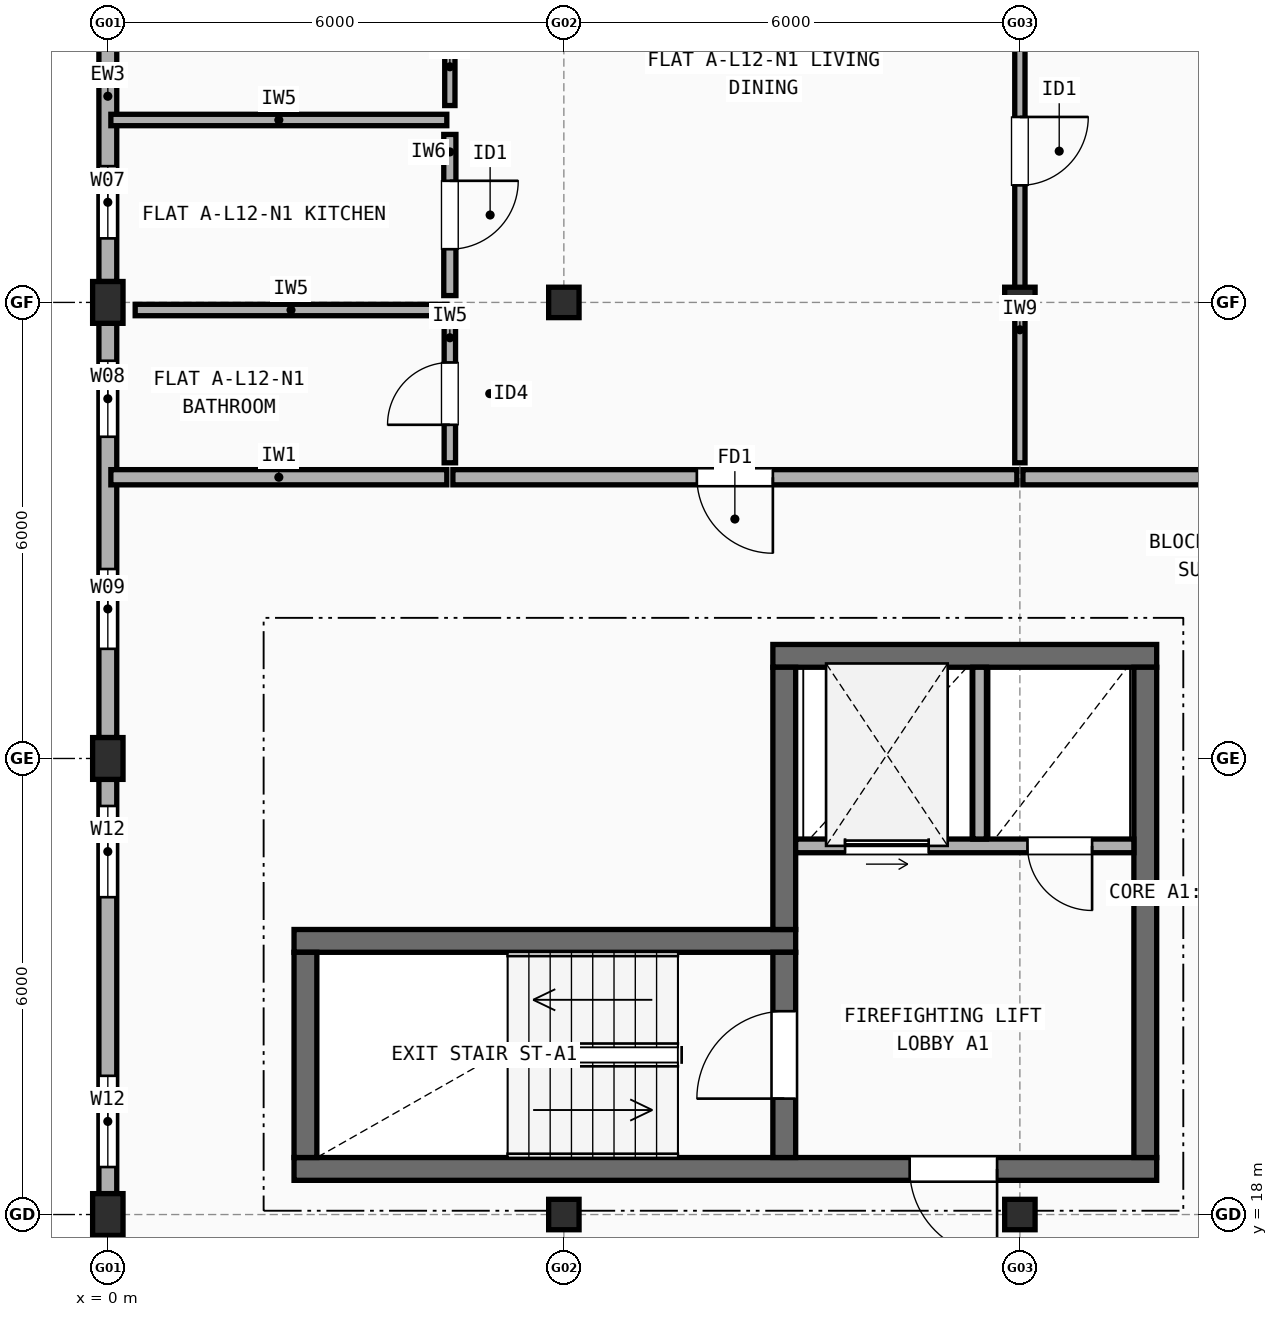
"""IFC4 building model, lengths in metres.
Left out: names, types, materials, properties, quantities, classifications, styles, units other than length and angle.
Written with IfcOpenShell. Run it as: python <this file> out.ifc"""

import sys

from ifc_helpers import new_model, si_unit, direction, frame, frame_2d, origin, origin_2d, place, context, subcontext, project, spatial, rectangle, extrude, element, fill, save


model = new_model("IFC4")
c1 = context("Model", 3, precision=1e-05, world=origin(), true_north=direction((0.0, 1.0)))
c2 = subcontext(c1, "Body", "Model", "MODEL_VIEW")
j1 = project(units=[si_unit("LENGTHUNIT", "METRE"), si_unit("PLANEANGLEUNIT", "RADIAN")], contexts=[c1])
p1 = place(None, origin())
s1 = spatial("IfcSite", under=j1, at=p1, CompositionType="ELEMENT")
p2 = place(p1, origin())
s2 = spatial("IfcBuilding", under=s1, at=p2, CompositionType="ELEMENT")
p3 = place(p2, frame((0.0, 0.0, 39.7)))
s3 = spatial("IfcBuildingStorey", under=s2, at=p3, CompositionType="ELEMENT", Elevation=39.7)
for number, where, z_axis, x_axis in (
    (1, (0.0, 18.0, 0.0), (0.0, 0.0, 1.0), (1.0, 0.0, 0.0)),
    (2, (0.0, 24.0, 0.0), (0.0, 0.0, 1.0), (1.0, 0.0, 0.0)),
    (3, (0.0, 30.0, 0.0), (0.0, 0.0, 1.0), (1.0, 0.0, 0.0)),
):
    element("IfcColumn", number, at=place(p3, frame(where, z_axis=z_axis, x_axis=x_axis)), inside=s3, PredefinedType="COLUMN", context=c2, shape_type="SweptSolid", body=[
        extrude(rectangle(XDim=0.4, YDim=0.55, at=origin_2d()), origin(), (0.0, 0.0, 1.0), 3.0),
    ])
for number, where, z_axis, x_axis in (
    (4, (6.0, 18.0, 0.0), (0.0, 0.0, 1.0), (1.0, 0.0, 0.0)),
    (5, (6.0, 30.0, 0.0), (0.0, 0.0, 1.0), (1.0, 0.0, 0.0)),
    (6, (12.0, 18.0, 0.0), (0.0, 0.0, 1.0), (1.0, 0.0, 0.0)),
    (7, (12.0, 30.0, 0.0), (0.0, 0.0, 1.0), (1.0, 0.0, 0.0)),
):
    element("IfcColumn", number, at=place(p3, frame(where, z_axis=z_axis, x_axis=x_axis)), inside=s3, PredefinedType="COLUMN", context=c2, shape_type="SweptSolid", body=[
        extrude(rectangle(XDim=0.4, YDim=0.4, at=origin_2d()), origin(), (0.0, 0.0, 1.0), 3.0),
    ])
p4 = place(p3, frame((0.0, 35.725, 0.0), z_axis=(0.0, 0.0, 1.0), x_axis=(0.0, -1.0, 0.0)))
e8 = element("IfcWall", 8, at=p4, inside=s3, PredefinedType="STANDARD", context=c2, shape_type="SweptSolid", body=[
    extrude(rectangle(XDim=5.45, YDim=0.235, at=frame_2d((2.725, 0.0))), origin(), (0.0, 0.0, 1.0), 2.482),
])
p5 = place(p4, frame((1.192, 0.0, 0.9)))
e9 = element("IfcOpeningElement", 9, at=p5, cuts=e8, PredefinedType="OPENING", context=c2, shape_type="SweptSolid", body=[
    extrude(rectangle(XDim=0.9, YDim=1.4, at=frame_2d((0.45, 0.7))), frame((0.0, 0.127, 0.0), z_axis=(0.0, -1.0, 0.0), x_axis=(1.0, 0.0, 0.0)), (0.0, 0.0, 1.0), 0.255),
])
p6 = place(p4, frame((3.933, 0.0, 0.9)))
e10 = element("IfcOpeningElement", 10, at=p6, cuts=e8, PredefinedType="OPENING", context=c2, shape_type="SweptSolid", body=[
    extrude(rectangle(XDim=0.95, YDim=1.35, at=frame_2d((0.475, 0.675))), frame((0.0, 0.127, 0.0), z_axis=(0.0, -1.0, 0.0), x_axis=(1.0, 0.0, 0.0)), (0.0, 0.0, 1.0), 0.255),
])
p7 = place(p3, frame((0.0, 29.725, 0.0), z_axis=(0.0, 0.0, 1.0), x_axis=(0.0, -1.0, 0.0)))
e11 = element("IfcWall", 11, at=p7, inside=s3, PredefinedType="STANDARD", context=c2, shape_type="SweptSolid", body=[
    extrude(rectangle(XDim=5.45, YDim=0.235, at=frame_2d((2.725, 0.0))), origin(), (0.0, 0.0, 1.0), 2.482),
])
p8 = place(p7, frame((0.492, 0.0, 0.9)))
e12 = element("IfcOpeningElement", 12, at=p8, cuts=e11, PredefinedType="OPENING", context=c2, shape_type="SweptSolid", body=[
    extrude(rectangle(XDim=1.0, YDim=1.4, at=frame_2d((0.5, 0.7))), frame((0.0, 0.127, 0.0), z_axis=(0.0, -1.0, 0.0), x_axis=(1.0, 0.0, 0.0)), (0.0, 0.0, 1.0), 0.255),
])
p9 = place(p7, frame((3.232, 0.0, 0.9)))
e13 = element("IfcOpeningElement", 13, at=p9, cuts=e11, PredefinedType="OPENING", context=c2, shape_type="SweptSolid", body=[
    extrude(rectangle(XDim=1.05, YDim=1.35, at=frame_2d((0.525, 0.675))), frame((0.0, 0.127, 0.0), z_axis=(0.0, -1.0, 0.0), x_axis=(1.0, 0.0, 0.0)), (0.0, 0.0, 1.0), 0.255),
])
p10 = place(p3, frame((0.0, 23.725, 0.0), z_axis=(0.0, 0.0, 1.0), x_axis=(0.0, -1.0, 0.0)))
e14 = element("IfcWall", 14, at=p10, inside=s3, PredefinedType="STANDARD", context=c2, shape_type="SweptSolid", body=[
    extrude(rectangle(XDim=5.45, YDim=0.235, at=frame_2d((2.725, 0.0))), origin(), (0.0, 0.0, 1.0), 2.482),
])
p11 = place(p10, frame((0.35, 0.0, 0.9)))
e15 = element("IfcOpeningElement", 15, at=p11, cuts=e14, PredefinedType="OPENING", context=c2, shape_type="SweptSolid", body=[
    extrude(rectangle(XDim=1.2, YDim=1.35, at=frame_2d((0.6, 0.675))), frame((0.0, 0.127, 0.0), z_axis=(0.0, -1.0, 0.0), x_axis=(1.0, 0.0, 0.0)), (0.0, 0.0, 1.0), 0.255),
])
p12 = place(p10, frame((3.9, 0.0, 0.9)))
e16 = element("IfcOpeningElement", 16, at=p12, cuts=e14, PredefinedType="OPENING", context=c2, shape_type="SweptSolid", body=[
    extrude(rectangle(XDim=1.2, YDim=1.35, at=frame_2d((0.6, 0.675))), frame((0.0, 0.127, 0.0), z_axis=(0.0, -1.0, 0.0), x_axis=(1.0, 0.0, 0.0)), (0.0, 0.0, 1.0), 0.255),
])
p13 = place(p3, frame((0.0, 17.725, 0.0), z_axis=(0.0, 0.0, 1.0), x_axis=(0.0, -1.0, 0.0)))
e17 = element("IfcWall", 17, at=p13, inside=s3, PredefinedType="STANDARD", context=c2, shape_type="SweptSolid", body=[
    extrude(rectangle(XDim=5.45, YDim=0.235, at=frame_2d((2.725, 0.0))), origin(), (0.0, 0.0, 1.0), 2.482),
])
p14 = place(p13, frame((0.692, 0.0, 0.9)))
e18 = element("IfcOpeningElement", 18, at=p14, cuts=e17, PredefinedType="OPENING", context=c2, shape_type="SweptSolid", body=[
    extrude(rectangle(XDim=0.9, YDim=1.4, at=frame_2d((0.45, 0.7))), frame((0.0, 0.127, 0.0), z_axis=(0.0, -1.0, 0.0), x_axis=(1.0, 0.0, 0.0)), (0.0, 0.0, 1.0), 0.255),
])
p15 = place(p13, frame((3.025, 0.0, 0.9)))
e19 = element("IfcOpeningElement", 19, at=p15, cuts=e17, PredefinedType="OPENING", context=c2, shape_type="SweptSolid", body=[
    extrude(rectangle(XDim=0.95, YDim=1.35, at=frame_2d((0.475, 0.675))), frame((0.0, 0.127, 0.0), z_axis=(0.0, -1.0, 0.0), x_axis=(1.0, 0.0, 0.0)), (0.0, 0.0, 1.0), 0.255),
])
p16 = place(p3, frame((2.45, 18.6, 0.0), z_axis=(0.0, 0.0, 1.0), x_axis=(1.0, 0.0, 0.0)))
e20 = element("IfcWall", 20, at=p16, inside=s3, PredefinedType="SHEAR", context=c2, shape_type="SweptSolid", body=[
    extrude(rectangle(XDim=11.35, YDim=0.3, at=frame_2d((5.675, 0.0))), origin(), (0.0, 0.0, 1.0), 3.0),
])
p17 = place(p16, frame((8.1, 0.0, 0.0)))
e21 = element("IfcOpeningElement", 21, at=p17, cuts=e20, PredefinedType="OPENING", context=c2, shape_type="SweptSolid", body=[
    extrude(rectangle(XDim=1.15, YDim=2.15, at=frame_2d((0.575, 1.075))), frame((0.0, 0.16, 0.0), z_axis=(0.0, -1.0, 0.0), x_axis=(1.0, 0.0, 0.0)), (0.0, 0.0, 1.0), 0.32),
])
p18 = place(p3, frame((9.05, 21.6, 0.0), z_axis=(0.0, 0.0, 1.0), x_axis=(-1.0, 0.0, 0.0)))
e22 = element("IfcWall", 22, at=p18, inside=s3, PredefinedType="SHEAR", context=c2, shape_type="SweptSolid", body=[
    extrude(rectangle(XDim=6.6, YDim=0.3, at=frame_2d((3.3, 0.0))), origin(), (0.0, 0.0, 1.0), 3.0),
])
p19 = place(p3, frame((2.6, 21.45, 0.0), z_axis=(0.0, 0.0, 1.0), x_axis=(0.0, -1.0, 0.0)))
e23 = element("IfcWall", 23, at=p19, inside=s3, PredefinedType="SHEAR", context=c2, shape_type="SweptSolid", body=[
    extrude(rectangle(XDim=2.7, YDim=0.3, at=frame_2d((1.35, 0.0))), origin(), (0.0, 0.0, 1.0), 3.0),
])
p20 = place(p3, frame((8.9, 18.75, 0.0), z_axis=(0.0, 0.0, 1.0), x_axis=(0.0, 1.0, 0.0)))
e24 = element("IfcWall", 24, at=p20, inside=s3, PredefinedType="SHEAR", context=c2, shape_type="SweptSolid", body=[
    extrude(rectangle(XDim=2.7, YDim=0.3, at=frame_2d((1.35, 0.0))), origin(), (0.0, 0.0, 1.0), 3.0),
])
p21 = place(p20, frame((0.775, 0.0, 0.0)))
e25 = element("IfcOpeningElement", 25, at=p21, cuts=e24, PredefinedType="OPENING", context=c2, shape_type="SweptSolid", body=[
    extrude(rectangle(XDim=1.15, YDim=2.15, at=frame_2d((0.575, 1.075))), frame((0.0, 0.16, 0.0), z_axis=(0.0, -1.0, 0.0), x_axis=(1.0, 0.0, 0.0)), (0.0, 0.0, 1.0), 0.32),
])
p22 = place(p3, frame((13.8, 25.35, 0.0), z_axis=(0.0, 0.0, 1.0), x_axis=(-1.0, 0.0, 0.0)))
e26 = element("IfcWall", 26, at=p22, inside=s3, PredefinedType="SHEAR", context=c2, shape_type="SweptSolid", body=[
    extrude(rectangle(XDim=5.05, YDim=0.3, at=frame_2d((2.525, 0.0))), origin(), (0.0, 0.0, 1.0), 3.0),
])
p23 = place(p3, frame((13.65, 18.75, 0.0), z_axis=(0.0, 0.0, 1.0), x_axis=(0.0, 1.0, 0.0)))
e27 = element("IfcWall", 27, at=p23, inside=s3, PredefinedType="SHEAR", context=c2, shape_type="SweptSolid", body=[
    extrude(rectangle(XDim=6.45, YDim=0.3, at=frame_2d((3.225, 0.0))), origin(), (0.0, 0.0, 1.0), 3.0),
])
p24 = place(p3, frame((8.9, 21.75, 0.0), z_axis=(0.0, 0.0, 1.0), x_axis=(0.0, 1.0, 0.0)))
e28 = element("IfcWall", 28, at=p24, inside=s3, PredefinedType="SHEAR", context=c2, shape_type="SweptSolid", body=[
    extrude(rectangle(XDim=3.45, YDim=0.3, at=frame_2d((1.725, 0.0))), origin(), (0.0, 0.0, 1.0), 3.0),
])
p25 = place(p3, frame((9.05, 22.85, 0.0), z_axis=(0.0, 0.0, 1.0), x_axis=(1.0, 0.0, 0.0)))
e29 = element("IfcWall", 29, at=p25, inside=s3, PredefinedType="SOLIDWALL", context=c2, shape_type="SweptSolid", body=[
    extrude(rectangle(XDim=4.45, YDim=0.18, at=frame_2d((2.225, 0.0))), origin(), (0.0, 0.0, 1.0), 3.0),
])
p26 = place(p25, frame((0.65, 0.0, 0.0)))
e30 = element("IfcOpeningElement", 30, at=p26, cuts=e29, PredefinedType="OPENING", context=c2, shape_type="SweptSolid", body=[
    extrude(rectangle(XDim=1.1, YDim=2.15, at=frame_2d((0.55, 1.075))), frame((0.0, 0.1, 0.0), z_axis=(0.0, -1.0, 0.0), x_axis=(1.0, 0.0, 0.0)), (0.0, 0.0, 1.0), 0.2),
])
p27 = place(p25, frame((3.05, 0.0, 0.0)))
e31 = element("IfcOpeningElement", 31, at=p27, cuts=e29, PredefinedType="OPENING", context=c2, shape_type="SweptSolid", body=[
    extrude(rectangle(XDim=0.85, YDim=2.1, at=frame_2d((0.425, 1.05))), frame((0.0, 0.1, 0.0), z_axis=(0.0, -1.0, 0.0), x_axis=(1.0, 0.0, 0.0)), (0.0, 0.0, 1.0), 0.2),
])
p28 = place(p3, frame((11.47, 22.94, 0.0), z_axis=(0.0, 0.0, 1.0), x_axis=(0.0, 1.0, 0.0)))
e32 = element("IfcWall", 32, at=p28, inside=s3, PredefinedType="SOLIDWALL", context=c2, shape_type="SweptSolid", body=[
    extrude(rectangle(XDim=2.26, YDim=0.18, at=frame_2d((1.13, 0.0))), origin(), (0.0, 0.0, 1.0), 3.0),
])
p29 = place(p3, frame((0.04, 27.7, 0.0), z_axis=(0.0, 0.0, 1.0), x_axis=(1.0, 0.0, 0.0)))
e33 = element("IfcWall", 33, at=p29, inside=s3, PredefinedType="SOLIDWALL", context=c2, shape_type="SweptSolid", body=[
    extrude(rectangle(XDim=4.42, YDim=0.2, at=frame_2d((2.21, 0.0))), origin(), (0.0, 0.0, 1.0), 2.482),
])
p30 = place(p3, frame((4.54, 27.7, 0.0), z_axis=(0.0, 0.0, 1.0), x_axis=(1.0, 0.0, 0.0)))
e34 = element("IfcWall", 34, at=p30, inside=s3, PredefinedType="SOLIDWALL", context=c2, shape_type="SweptSolid", body=[
    extrude(rectangle(XDim=7.42, YDim=0.2, at=frame_2d((3.71, 0.0))), origin(), (0.0, 0.0, 1.0), 2.508),
])
p31 = place(p30, frame((3.21, 0.0, 0.0)))
e35 = element("IfcOpeningElement", 35, at=p31, cuts=e34, PredefinedType="OPENING", context=c2, shape_type="SweptSolid", body=[
    extrude(rectangle(XDim=1.0, YDim=2.15, at=frame_2d((0.5, 1.075))), frame((0.0, 0.11, 0.0), z_axis=(0.0, -1.0, 0.0), x_axis=(1.0, 0.0, 0.0)), (0.0, 0.0, 1.0), 0.22),
])
p32 = place(p3, frame((4.5, 32.59, 0.0), z_axis=(0.0, 0.0, 1.0), x_axis=(0.0, 1.0, 0.0)))
e36 = element("IfcWall", 36, at=p32, inside=s3, PredefinedType="PARTITIONING", context=c2, shape_type="SweptSolid", body=[
    extrude(rectangle(XDim=3.22, YDim=0.135, at=frame_2d((1.61, 0.0))), origin(), (0.0, 0.0, 1.0), 3.0),
])
p33 = place(p32, frame((1.17, 0.0, 0.0)))
e37 = element("IfcOpeningElement", 37, at=p33, cuts=e36, PredefinedType="OPENING", context=c2, shape_type="SweptSolid", body=[
    extrude(rectangle(XDim=0.88, YDim=2.1, at=frame_2d((0.44, 1.05))), frame((0.0, 0.077, 0.0), z_axis=(0.0, -1.0, 0.0), x_axis=(1.0, 0.0, 0.0)), (0.0, 0.0, 1.0), 0.155),
])
p34 = place(p3, frame((4.5, 30.09, 0.0), z_axis=(0.0, 0.0, 1.0), x_axis=(0.0, 1.0, 0.0)))
e38 = element("IfcWall", 38, at=p34, inside=s3, PredefinedType="PLUMBINGWALL", context=c2, shape_type="SweptSolid", body=[
    extrude(rectangle(XDim=2.12, YDim=0.16, at=frame_2d((1.06, 0.0))), origin(), (0.0, 0.0, 1.0), 2.532),
])
p35 = place(p34, frame((0.61, 0.0, 0.0)))
e39 = element("IfcOpeningElement", 39, at=p35, cuts=e38, PredefinedType="OPENING", context=c2, shape_type="SweptSolid", body=[
    extrude(rectangle(XDim=0.9, YDim=2.1, at=frame_2d((0.45, 1.05))), frame((0.0, 0.09, 0.0), z_axis=(0.0, -1.0, 0.0), x_axis=(1.0, 0.0, 0.0)), (0.0, 0.0, 1.0), 0.18),
])
p36 = place(p3, frame((4.5, 27.89, 0.0), z_axis=(0.0, 0.0, 1.0), x_axis=(0.0, 1.0, 0.0)))
e40 = element("IfcWall", 40, at=p36, inside=s3, PredefinedType="PARTITIONING", context=c2, shape_type="SweptSolid", body=[
    extrude(rectangle(XDim=1.82, YDim=0.15, at=frame_2d((0.91, 0.0))), origin(), (0.0, 0.0, 1.0), 3.0),
])
p37 = place(p36, frame((0.5, 0.0, 0.0)))
e41 = element("IfcOpeningElement", 41, at=p37, cuts=e40, PredefinedType="OPENING", context=c2, shape_type="SweptSolid", body=[
    extrude(rectangle(XDim=0.82, YDim=2.08, at=frame_2d((0.41, 1.04))), frame((0.0, 0.085, 0.0), z_axis=(0.0, -1.0, 0.0), x_axis=(1.0, 0.0, 0.0)), (0.0, 0.0, 1.0), 0.17),
])
p38 = place(p3, frame((0.04, 32.4, 0.0), z_axis=(0.0, 0.0, 1.0), x_axis=(1.0, 0.0, 0.0)))
e42 = element("IfcWall", 42, at=p38, inside=s3, PredefinedType="PARTITIONING", context=c2, shape_type="SweptSolid", body=[
    extrude(rectangle(XDim=4.42, YDim=0.15, at=frame_2d((2.21, 0.0))), origin(), (0.0, 0.0, 1.0), 2.482),
])
p39 = place(p3, frame((0.36, 29.9, 0.0), z_axis=(0.0, 0.0, 1.0), x_axis=(1.0, 0.0, 0.0)))
e43 = element("IfcWall", 43, at=p39, inside=s3, PredefinedType="PARTITIONING", context=c2, shape_type="SweptSolid", body=[
    extrude(rectangle(XDim=4.1, YDim=0.15, at=frame_2d((2.05, 0.0))), origin(), (0.0, 0.0, 1.0), 2.532),
])
p40 = place(p3, frame((12.04, 27.7, 0.0), z_axis=(0.0, 0.0, 1.0), x_axis=(1.0, 0.0, 0.0)))
e44 = element("IfcWall", 44, at=p40, inside=s3, PredefinedType="SOLIDWALL", context=c2, shape_type="SweptSolid", body=[
    extrude(rectangle(XDim=2.92, YDim=0.2, at=frame_2d((1.46, 0.0))), origin(), (0.0, 0.0, 1.0), 2.508),
])
p41 = place(p3, frame((12.0, 27.89, 0.0), z_axis=(0.0, 0.0, 1.0), x_axis=(0.0, 1.0, 0.0)))
e45 = element("IfcWall", 45, at=p41, inside=s3, PredefinedType="PARTITIONING", context=c2, shape_type="SweptSolid", body=[
    extrude(rectangle(XDim=7.6, YDim=0.135, at=frame_2d((3.8, 0.0))), origin(), (0.0, 0.0, 1.0), 2.508),
])
p42 = place(p41, frame((3.65, 0.0, 0.0)))
e46 = element("IfcOpeningElement", 46, at=p42, cuts=e45, PredefinedType="OPENING", context=c2, shape_type="SweptSolid", body=[
    extrude(rectangle(XDim=0.9, YDim=2.1, at=frame_2d((0.45, 1.05))), frame((0.0, 0.077, 0.0), z_axis=(0.0, -1.0, 0.0), x_axis=(1.0, 0.0, 0.0)), (0.0, 0.0, 1.0), 0.155),
])
p43 = place(p6, origin())
e47 = element("IfcWindow", 47, at=p43, inside=s3, PartitioningType="SINGLE_PANEL", PredefinedType="WINDOW", context=c2, shape_type="SweptSolid", body=[
    extrude(rectangle(XDim=0.95, YDim=1.35, at=frame_2d((0.475, 0.675))), frame((0.0, 0.03, 0.0), z_axis=(0.0, -1.0, 0.0), x_axis=(1.0, 0.0, 0.0)), (0.0, 0.0, 1.0), 0.06),
])
fill(e10, e47)
p44 = place(p8, origin())
e48 = element("IfcWindow", 48, at=p44, inside=s3, PartitioningType="SINGLE_PANEL", PredefinedType="WINDOW", context=c2, shape_type="SweptSolid", body=[
    extrude(rectangle(XDim=1.0, YDim=1.4, at=frame_2d((0.5, 0.7))), frame((0.0, 0.03, 0.0), z_axis=(0.0, -1.0, 0.0), x_axis=(1.0, 0.0, 0.0)), (0.0, 0.0, 1.0), 0.06),
])
fill(e12, e48)
p45 = place(p9, origin())
e49 = element("IfcWindow", 49, at=p45, inside=s3, PartitioningType="SINGLE_PANEL", PredefinedType="WINDOW", context=c2, shape_type="SweptSolid", body=[
    extrude(rectangle(XDim=1.05, YDim=1.35, at=frame_2d((0.525, 0.675))), frame((0.0, 0.03, 0.0), z_axis=(0.0, -1.0, 0.0), x_axis=(1.0, 0.0, 0.0)), (0.0, 0.0, 1.0), 0.06),
])
fill(e13, e49)
p46 = place(p11, origin())
e50 = element("IfcWindow", 50, at=p46, inside=s3, PartitioningType="SINGLE_PANEL", PredefinedType="WINDOW", context=c2, shape_type="SweptSolid", body=[
    extrude(rectangle(XDim=1.2, YDim=1.35, at=frame_2d((0.6, 0.675))), frame((0.0, 0.03, 0.0), z_axis=(0.0, -1.0, 0.0), x_axis=(1.0, 0.0, 0.0)), (0.0, 0.0, 1.0), 0.06),
])
fill(e15, e50)
p47 = place(p12, origin())
e51 = element("IfcWindow", 51, at=p47, inside=s3, PartitioningType="SINGLE_PANEL", PredefinedType="WINDOW", context=c2, shape_type="SweptSolid", body=[
    extrude(rectangle(XDim=1.2, YDim=1.35, at=frame_2d((0.6, 0.675))), frame((0.0, 0.03, 0.0), z_axis=(0.0, -1.0, 0.0), x_axis=(1.0, 0.0, 0.0)), (0.0, 0.0, 1.0), 0.06),
])
fill(e16, e51)
p48 = place(p17, origin())
e52 = element("IfcDoor", 52, at=p48, inside=s3, OperationType="SINGLE_SWING_RIGHT", PredefinedType="DOOR", context=c2, shape_type="SweptSolid", body=[
    extrude(rectangle(XDim=1.15, YDim=2.15, at=frame_2d((0.575, 1.075))), frame((0.0, 0.025, 0.0), z_axis=(0.0, -1.0, 0.0), x_axis=(1.0, 0.0, 0.0)), (0.0, 0.0, 1.0), 0.05),
])
fill(e21, e52)
p49 = place(p21, origin())
e53 = element("IfcDoor", 53, at=p49, inside=s3, OperationType="SINGLE_SWING_LEFT", PredefinedType="DOOR", context=c2, shape_type="SweptSolid", body=[
    extrude(rectangle(XDim=1.15, YDim=2.15, at=frame_2d((0.575, 1.075))), frame((0.0, 0.025, 0.0), z_axis=(0.0, -1.0, 0.0), x_axis=(1.0, 0.0, 0.0)), (0.0, 0.0, 1.0), 0.05),
])
fill(e25, e53)
p50 = place(p26, origin())
e54 = element("IfcDoor", 54, at=p50, inside=s3, OperationType="SLIDING_TO_LEFT", PredefinedType="DOOR", context=c2, shape_type="SweptSolid", body=[
    extrude(rectangle(XDim=1.1, YDim=2.15, at=frame_2d((0.55, 1.075))), frame((0.0, 0.025, 0.0), z_axis=(0.0, -1.0, 0.0), x_axis=(1.0, 0.0, 0.0)), (0.0, 0.0, 1.0), 0.05),
])
fill(e30, e54)
p51 = place(p27, frame((0.85, 0.0, 0.0), z_axis=(0.0, 0.0, 1.0), x_axis=(-1.0, 0.0, 0.0)))
e55 = element("IfcDoor", 55, at=p51, inside=s3, OperationType="SINGLE_SWING_RIGHT", PredefinedType="DOOR", context=c2, shape_type="SweptSolid", body=[
    extrude(rectangle(XDim=0.85, YDim=2.1, at=frame_2d((0.425, 1.05))), frame((0.0, 0.025, 0.0), z_axis=(0.0, -1.0, 0.0), x_axis=(1.0, 0.0, 0.0)), (0.0, 0.0, 1.0), 0.05),
])
fill(e31, e55)
p52 = place(p31, origin())
e56 = element("IfcDoor", 56, at=p52, inside=s3, OperationType="SINGLE_SWING_RIGHT", PredefinedType="DOOR", context=c2, shape_type="SweptSolid", body=[
    extrude(rectangle(XDim=1.0, YDim=2.15, at=frame_2d((0.5, 1.075))), frame((0.0, 0.025, 0.0), z_axis=(0.0, -1.0, 0.0), x_axis=(1.0, 0.0, 0.0)), (0.0, 0.0, 1.0), 0.05),
])
fill(e35, e56)
p53 = place(p35, origin())
e57 = element("IfcDoor", 57, at=p53, inside=s3, OperationType="SINGLE_SWING_RIGHT", PredefinedType="DOOR", context=c2, shape_type="SweptSolid", body=[
    extrude(rectangle(XDim=0.9, YDim=2.1, at=frame_2d((0.45, 1.05))), frame((0.0, 0.025, 0.0), z_axis=(0.0, -1.0, 0.0), x_axis=(1.0, 0.0, 0.0)), (0.0, 0.0, 1.0), 0.05),
])
fill(e39, e57)
p54 = place(p37, origin())
e58 = element("IfcDoor", 58, at=p54, inside=s3, OperationType="SINGLE_SWING_LEFT", PredefinedType="DOOR", context=c2, shape_type="SweptSolid", body=[
    extrude(rectangle(XDim=0.82, YDim=2.08, at=frame_2d((0.41, 1.04))), frame((0.0, 0.025, 0.0), z_axis=(0.0, -1.0, 0.0), x_axis=(1.0, 0.0, 0.0)), (0.0, 0.0, 1.0), 0.05),
])
fill(e41, e58)
p55 = place(p42, origin())
e59 = element("IfcDoor", 59, at=p55, inside=s3, OperationType="SINGLE_SWING_RIGHT", PredefinedType="DOOR", context=c2, shape_type="SweptSolid", body=[
    extrude(rectangle(XDim=0.9, YDim=2.1, at=frame_2d((0.45, 1.05))), frame((0.0, 0.025, 0.0), z_axis=(0.0, -1.0, 0.0), x_axis=(1.0, 0.0, 0.0)), (0.0, 0.0, 1.0), 0.05),
])
fill(e46, e59)
save(model, sys.argv[1])
